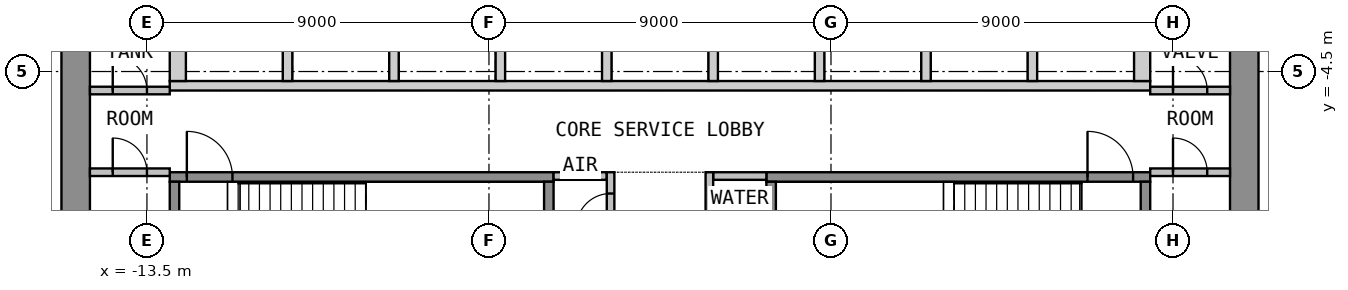
"""IFC4 building model, lengths in metres.
Left out: names, types, materials, properties, quantities, classifications, styles, units other than length and angle.
Written with IfcOpenShell. Run it as: python <this file> out.ifc"""

import sys

from ifc_helpers import new_model, si_unit, direction, frame, frame_2d, origin, place, context, subcontext, project, spatial, polyline, rectangle, outline, extrude, element, fill, save


model = new_model("IFC4")
c1 = context("Model", 3, precision=1e-05, world=origin(), true_north=direction((0.0, 1.0)))
c2 = subcontext(c1, "Body", "Model", "MODEL_VIEW")
j1 = project(units=[si_unit("LENGTHUNIT", "METRE"), si_unit("PLANEANGLEUNIT", "RADIAN")], contexts=[c1])
p1 = place(None, origin())
s1 = spatial("IfcSite", under=j1, at=p1, CompositionType="ELEMENT")
p2 = place(p1, origin())
s2 = spatial("IfcBuilding", under=s1, at=p2, CompositionType="ELEMENT")
p3 = place(p2, frame((0.0, 0.0, 128.1)))
s3 = spatial("IfcBuildingStorey", under=s2, at=p3, CompositionType="ELEMENT", Elevation=128.1)
p4 = place(p3, frame((-15.375, -12.75, 0.0), z_axis=(0.0, 0.0, 1.0), x_axis=(0.0, 1.0, 0.0)))
e1 = element("IfcWall", 1, at=p4, inside=s3, PredefinedType="SHEAR", context=c2, shape_type="SweptSolid", body=[
    extrude(rectangle(XDim=25.5, YDim=0.75, at=frame_2d((12.75, 0.0))), origin(), (0.0, 0.0, 1.0), 4.175),
])
p5 = place(p4, frame((11.55, 0.0, 0.0)))
e2 = element("IfcOpeningElement", 2, at=p5, cuts=e1, PredefinedType="OPENING", context=c2, shape_type="SweptSolid", body=[
    extrude(rectangle(XDim=2.4, YDim=2.1, at=frame_2d((1.2, 1.05))), frame((0.0, 0.385, 0.0), z_axis=(0.0, -1.0, 0.0), x_axis=(1.0, 0.0, 0.0)), (0.0, 0.0, 1.0), 0.77),
])
p6 = place(p3, frame((15.375, -12.75, 0.0), z_axis=(0.0, 0.0, 1.0), x_axis=(0.0, 1.0, 0.0)))
e3 = element("IfcWall", 3, at=p6, inside=s3, PredefinedType="SHEAR", context=c2, shape_type="SweptSolid", body=[
    extrude(rectangle(XDim=25.5, YDim=0.75, at=frame_2d((12.75, 0.0))), origin(), (0.0, 0.0, 1.0), 4.175),
])
p7 = place(p6, frame((11.55, 0.0, 0.0)))
e4 = element("IfcOpeningElement", 4, at=p7, cuts=e3, PredefinedType="OPENING", context=c2, shape_type="SweptSolid", body=[
    extrude(rectangle(XDim=2.4, YDim=2.1, at=frame_2d((1.2, 1.05))), frame((0.0, 0.385, 0.0), z_axis=(0.0, -1.0, 0.0), x_axis=(1.0, 0.0, 0.0)), (0.0, 0.0, 1.0), 0.77),
])
p8 = place(p3, origin())
e5 = element("IfcWall", 5, at=p8, inside=s3, PredefinedType="SHEAR", context=c2, shape_type="SweptSolid", body=[
    extrude(outline(polyline([(-12.9, -5.0), (12.9, -5.0), (12.9, -4.75), (-12.9, -4.75), (-12.9, -5.0)])), origin(), (0.0, 0.0, 1.0), 4.175),
])
p9 = place(p3, origin())
e6 = element("IfcWall", 6, at=p9, inside=s3, PredefinedType="SHEAR", context=c2, shape_type="SweptSolid", body=[
    extrude(outline(polyline([(-12.9, -4.75), (-12.475, -4.75), (-12.475, -2.05), (-12.9, -2.05), (-12.9, -4.75)])), origin(), (0.0, 0.0, 1.0), 4.175),
])
p10 = place(p3, origin())
e7 = element("IfcWall", 7, at=p10, inside=s3, PredefinedType="SHEAR", context=c2, shape_type="SweptSolid", body=[
    extrude(outline(polyline([(-9.925, -4.75), (-9.675, -4.75), (-9.675, -2.05), (-9.925, -2.05), (-9.925, -4.75)])), origin(), (0.0, 0.0, 1.0), 4.175),
])
p11 = place(p3, origin())
e8 = element("IfcWall", 8, at=p11, inside=s3, PredefinedType="SHEAR", context=c2, shape_type="SweptSolid", body=[
    extrude(outline(polyline([(-7.125, -4.75), (-6.875, -4.75), (-6.875, -2.05), (-7.125, -2.05), (-7.125, -4.75)])), origin(), (0.0, 0.0, 1.0), 4.175),
])
p12 = place(p3, origin())
e9 = element("IfcWall", 9, at=p12, inside=s3, PredefinedType="SHEAR", context=c2, shape_type="SweptSolid", body=[
    extrude(outline(polyline([(-4.325, -4.75), (-4.075, -4.75), (-4.075, -2.05), (-4.325, -2.05), (-4.325, -4.75)])), origin(), (0.0, 0.0, 1.0), 4.175),
])
p13 = place(p3, origin())
e10 = element("IfcWall", 10, at=p13, inside=s3, PredefinedType="SHEAR", context=c2, shape_type="SweptSolid", body=[
    extrude(outline(polyline([(-1.525, -4.75), (-1.275, -4.75), (-1.275, -2.05), (-1.525, -2.05), (-1.525, -4.75)])), origin(), (0.0, 0.0, 1.0), 4.175),
])
p14 = place(p3, origin())
e11 = element("IfcWall", 11, at=p14, inside=s3, PredefinedType="SHEAR", context=c2, shape_type="SweptSolid", body=[
    extrude(outline(polyline([(1.275, -4.75), (1.525, -4.75), (1.525, -2.05), (1.275, -2.05), (1.275, -4.75)])), origin(), (0.0, 0.0, 1.0), 4.175),
])
p15 = place(p3, origin())
e12 = element("IfcWall", 12, at=p15, inside=s3, PredefinedType="SHEAR", context=c2, shape_type="SweptSolid", body=[
    extrude(outline(polyline([(4.075, -4.75), (4.325, -4.75), (4.325, -2.05), (4.075, -2.05), (4.075, -4.75)])), origin(), (0.0, 0.0, 1.0), 4.175),
])
p16 = place(p3, origin())
e13 = element("IfcWall", 13, at=p16, inside=s3, PredefinedType="SHEAR", context=c2, shape_type="SweptSolid", body=[
    extrude(outline(polyline([(6.875, -4.75), (7.125, -4.75), (7.125, -2.05), (6.875, -2.05), (6.875, -4.75)])), origin(), (0.0, 0.0, 1.0), 4.175),
])
p17 = place(p3, origin())
e14 = element("IfcWall", 14, at=p17, inside=s3, PredefinedType="SHEAR", context=c2, shape_type="SweptSolid", body=[
    extrude(outline(polyline([(9.675, -4.75), (9.925, -4.75), (9.925, -2.05), (9.675, -2.05), (9.675, -4.75)])), origin(), (0.0, 0.0, 1.0), 4.175),
])
p18 = place(p3, origin())
e15 = element("IfcWall", 15, at=p18, inside=s3, PredefinedType="SHEAR", context=c2, shape_type="SweptSolid", body=[
    extrude(outline(polyline([(12.475, -4.75), (12.9, -4.75), (12.9, -2.05), (12.475, -2.05), (12.475, -4.75)])), origin(), (0.0, 0.0, 1.0), 4.175),
])
p19 = place(p3, frame((-12.9, -7.275, 0.0), z_axis=(0.0, 0.0, 1.0), x_axis=(1.0, 0.0, 0.0)))
e16 = element("IfcWall", 16, at=p19, inside=s3, PredefinedType="SHEAR", context=c2, shape_type="SweptSolid", body=[
    extrude(rectangle(XDim=10.1, YDim=0.25, at=frame_2d((5.05, 0.0))), origin(), (0.0, 0.0, 1.0), 4.175),
])
p20 = place(p19, frame((0.45, 0.0, 0.0)))
e17 = element("IfcOpeningElement", 17, at=p20, cuts=e16, PredefinedType="OPENING", context=c2, shape_type="SweptSolid", body=[
    extrude(rectangle(XDim=1.2, YDim=2.1, at=frame_2d((0.6, 1.05))), frame((0.0, 0.135, 0.0), z_axis=(0.0, -1.0, 0.0), x_axis=(1.0, 0.0, 0.0)), (0.0, 0.0, 1.0), 0.27),
])
for number, where, z_axis, x_axis in (
    (18, (-12.775, -10.65, 0.0), (0.0, 0.0, 1.0), (0.0, 1.0, 0.0)),
    (19, (-2.925, -10.65, 0.0), (0.0, 0.0, 1.0), (0.0, 1.0, 0.0)),
):
    element("IfcWall", number, at=place(p3, frame(where, z_axis=z_axis, x_axis=x_axis)), inside=s3, PredefinedType="SHEAR", context=c2, shape_type="SweptSolid", body=[
        extrude(rectangle(XDim=3.25, YDim=0.25, at=frame_2d((1.625, 0.0))), origin(), (0.0, 0.0, 1.0), 4.175),
    ])
p21 = place(p3, frame((2.8, -7.275, 0.0), z_axis=(0.0, 0.0, 1.0), x_axis=(1.0, 0.0, 0.0)))
e20 = element("IfcWall", 20, at=p21, inside=s3, PredefinedType="SHEAR", context=c2, shape_type="SweptSolid", body=[
    extrude(rectangle(XDim=10.1, YDim=0.25, at=frame_2d((5.05, 0.0))), origin(), (0.0, 0.0, 1.0), 4.175),
])
p22 = place(p21, frame((8.45, 0.0, 0.0)))
e21 = element("IfcOpeningElement", 21, at=p22, cuts=e20, PredefinedType="OPENING", context=c2, shape_type="SweptSolid", body=[
    extrude(rectangle(XDim=1.2, YDim=2.1, at=frame_2d((0.6, 1.05))), frame((0.0, 0.135, 0.0), z_axis=(0.0, -1.0, 0.0), x_axis=(1.0, 0.0, 0.0)), (0.0, 0.0, 1.0), 0.27),
])
for number, where, z_axis, x_axis in (
    (22, (2.925, -10.65, 0.0), (0.0, 0.0, 1.0), (0.0, 1.0, 0.0)),
    (23, (12.775, -10.65, 0.0), (0.0, 0.0, 1.0), (0.0, 1.0, 0.0)),
):
    element("IfcWall", number, at=place(p3, frame(where, z_axis=z_axis, x_axis=x_axis)), inside=s3, PredefinedType="SHEAR", context=c2, shape_type="SweptSolid", body=[
        extrude(rectangle(XDim=3.25, YDim=0.25, at=frame_2d((1.625, 0.0))), origin(), (0.0, 0.0, 1.0), 4.175),
    ])
for number, where, z_axis, x_axis in (
    (24, (-2.8, -7.25, 0.0), (0.0, 0.0, 1.0), (1.0, 0.0, 0.0)),
    (25, (1.4, -7.25, 0.0), (0.0, 0.0, 1.0), (1.0, 0.0, 0.0)),
):
    element("IfcWall", number, at=place(p3, frame(where, z_axis=z_axis, x_axis=x_axis)), inside=s3, PredefinedType="PARTITIONING", context=c2, shape_type="SweptSolid", body=[
        extrude(rectangle(XDim=1.4, YDim=0.2, at=frame_2d((0.7, 0.0))), origin(), (0.0, 0.0, 1.0), 4.175),
    ])
p23 = place(p3, frame((-1.3, -12.75, 0.0), z_axis=(0.0, 0.0, 1.0), x_axis=(0.0, 1.0, 0.0)))
e26 = element("IfcWall", 26, at=p23, inside=s3, PredefinedType="PARTITIONING", context=c2, shape_type="SweptSolid", body=[
    extrude(rectangle(XDim=5.6, YDim=0.2, at=frame_2d((2.8, 0.0))), origin(), (0.0, 0.0, 1.0), 4.175),
])
p24 = place(p23, frame((1.44, 0.0, 0.0)))
e27 = element("IfcOpeningElement", 27, at=p24, cuts=e26, PredefinedType="OPENING", context=c2, shape_type="SweptSolid", body=[
    extrude(rectangle(XDim=0.9, YDim=2.1, at=frame_2d((0.45, 1.05))), frame((0.0, 0.11, 0.0), z_axis=(0.0, -1.0, 0.0), x_axis=(1.0, 0.0, 0.0)), (0.0, 0.0, 1.0), 0.22),
])
p25 = place(p23, frame((4.14, 0.0, 0.0)))
e28 = element("IfcOpeningElement", 28, at=p25, cuts=e26, PredefinedType="OPENING", context=c2, shape_type="SweptSolid", body=[
    extrude(rectangle(XDim=0.9, YDim=2.1, at=frame_2d((0.45, 1.05))), frame((0.0, 0.11, 0.0), z_axis=(0.0, -1.0, 0.0), x_axis=(1.0, 0.0, 0.0)), (0.0, 0.0, 1.0), 0.22),
])
p26 = place(p3, frame((1.3, -12.75, 0.0), z_axis=(0.0, 0.0, 1.0), x_axis=(0.0, 1.0, 0.0)))
e29 = element("IfcWall", 29, at=p26, inside=s3, PredefinedType="PARTITIONING", context=c2, shape_type="SweptSolid", body=[
    extrude(rectangle(XDim=5.6, YDim=0.2, at=frame_2d((2.8, 0.0))), origin(), (0.0, 0.0, 1.0), 4.175),
])
p27 = place(p26, frame((0.36, 0.0, 0.0)))
e30 = element("IfcOpeningElement", 30, at=p27, cuts=e29, PredefinedType="OPENING", context=c2, shape_type="SweptSolid", body=[
    extrude(rectangle(XDim=0.9, YDim=2.1, at=frame_2d((0.45, 1.05))), frame((0.0, 0.11, 0.0), z_axis=(0.0, -1.0, 0.0), x_axis=(1.0, 0.0, 0.0)), (0.0, 0.0, 1.0), 0.22),
])
p28 = place(p26, frame((3.06, 0.0, 0.0)))
e31 = element("IfcOpeningElement", 31, at=p28, cuts=e29, PredefinedType="OPENING", context=c2, shape_type="SweptSolid", body=[
    extrude(rectangle(XDim=0.9, YDim=2.1, at=frame_2d((0.45, 1.05))), frame((0.0, 0.11, 0.0), z_axis=(0.0, -1.0, 0.0), x_axis=(1.0, 0.0, 0.0)), (0.0, 0.0, 1.0), 0.22),
])
p29 = place(p3, frame((-15.0, -7.15, 0.0), z_axis=(0.0, 0.0, 1.0), x_axis=(1.0, 0.0, 0.0)))
e32 = element("IfcWall", 32, at=p29, inside=s3, PredefinedType="PARTITIONING", context=c2, shape_type="SweptSolid", body=[
    extrude(rectangle(XDim=2.1, YDim=0.2, at=frame_2d((1.05, 0.0))), origin(), (0.0, 0.0, 1.0), 4.175),
])
p30 = place(p29, frame((0.6, 0.0, 0.0)))
e33 = element("IfcOpeningElement", 33, at=p30, cuts=e32, PredefinedType="OPENING", context=c2, shape_type="SweptSolid", body=[
    extrude(rectangle(XDim=0.9, YDim=2.1, at=frame_2d((0.45, 1.05))), frame((0.0, 0.11, 0.0), z_axis=(0.0, -1.0, 0.0), x_axis=(1.0, 0.0, 0.0)), (0.0, 0.0, 1.0), 0.22),
])
p31 = place(p3, frame((-15.0, -5.0, 0.0), z_axis=(0.0, 0.0, 1.0), x_axis=(1.0, 0.0, 0.0)))
e34 = element("IfcWall", 34, at=p31, inside=s3, PredefinedType="PARTITIONING", context=c2, shape_type="SweptSolid", body=[
    extrude(rectangle(XDim=2.1, YDim=0.2, at=frame_2d((1.05, 0.0))), origin(), (0.0, 0.0, 1.0), 4.175),
])
p32 = place(p31, frame((0.6, 0.0, 0.0)))
e35 = element("IfcOpeningElement", 35, at=p32, cuts=e34, PredefinedType="OPENING", context=c2, shape_type="SweptSolid", body=[
    extrude(rectangle(XDim=0.9, YDim=2.1, at=frame_2d((0.45, 1.05))), frame((0.0, 0.11, 0.0), z_axis=(0.0, -1.0, 0.0), x_axis=(1.0, 0.0, 0.0)), (0.0, 0.0, 1.0), 0.22),
])
p33 = place(p3, frame((12.9, -7.15, 0.0), z_axis=(0.0, 0.0, 1.0), x_axis=(1.0, 0.0, 0.0)))
e36 = element("IfcWall", 36, at=p33, inside=s3, PredefinedType="PARTITIONING", context=c2, shape_type="SweptSolid", body=[
    extrude(rectangle(XDim=2.1, YDim=0.2, at=frame_2d((1.05, 0.0))), origin(), (0.0, 0.0, 1.0), 4.175),
])
p34 = place(p33, frame((0.6, 0.0, 0.0)))
e37 = element("IfcOpeningElement", 37, at=p34, cuts=e36, PredefinedType="OPENING", context=c2, shape_type="SweptSolid", body=[
    extrude(rectangle(XDim=0.9, YDim=2.1, at=frame_2d((0.45, 1.05))), frame((0.0, 0.11, 0.0), z_axis=(0.0, -1.0, 0.0), x_axis=(1.0, 0.0, 0.0)), (0.0, 0.0, 1.0), 0.22),
])
p35 = place(p3, frame((12.9, -5.0, 0.0), z_axis=(0.0, 0.0, 1.0), x_axis=(1.0, 0.0, 0.0)))
e38 = element("IfcWall", 38, at=p35, inside=s3, PredefinedType="PARTITIONING", context=c2, shape_type="SweptSolid", body=[
    extrude(rectangle(XDim=2.1, YDim=0.2, at=frame_2d((1.05, 0.0))), origin(), (0.0, 0.0, 1.0), 4.175),
])
p36 = place(p35, frame((0.6, 0.0, 0.0)))
e39 = element("IfcOpeningElement", 39, at=p36, cuts=e38, PredefinedType="OPENING", context=c2, shape_type="SweptSolid", body=[
    extrude(rectangle(XDim=0.9, YDim=2.1, at=frame_2d((0.45, 1.05))), frame((0.0, 0.11, 0.0), z_axis=(0.0, -1.0, 0.0), x_axis=(1.0, 0.0, 0.0)), (0.0, 0.0, 1.0), 0.22),
])
p37 = place(p20, origin())
e40 = element("IfcDoor", 40, at=p37, inside=s3, OperationType="SINGLE_SWING_LEFT", PredefinedType="DOOR", context=c2, shape_type="SweptSolid", body=[
    extrude(rectangle(XDim=1.2, YDim=2.1, at=frame_2d((0.6, 1.05))), frame((0.0, 0.025, 0.0), z_axis=(0.0, -1.0, 0.0), x_axis=(1.0, 0.0, 0.0)), (0.0, 0.0, 1.0), 0.05),
])
fill(e17, e40)
p38 = place(p22, origin())
e41 = element("IfcDoor", 41, at=p38, inside=s3, OperationType="SINGLE_SWING_LEFT", PredefinedType="DOOR", context=c2, shape_type="SweptSolid", body=[
    extrude(rectangle(XDim=1.2, YDim=2.1, at=frame_2d((0.6, 1.05))), frame((0.0, 0.025, 0.0), z_axis=(0.0, -1.0, 0.0), x_axis=(1.0, 0.0, 0.0)), (0.0, 0.0, 1.0), 0.05),
])
fill(e21, e41)
p39 = place(p25, origin())
e42 = element("IfcDoor", 42, at=p39, inside=s3, OperationType="SINGLE_SWING_LEFT", PredefinedType="DOOR", context=c2, shape_type="SweptSolid", body=[
    extrude(rectangle(XDim=0.9, YDim=2.1, at=frame_2d((0.45, 1.05))), frame((0.0, 0.025, 0.0), z_axis=(0.0, -1.0, 0.0), x_axis=(1.0, 0.0, 0.0)), (0.0, 0.0, 1.0), 0.05),
])
fill(e28, e42)
p40 = place(p30, origin())
e43 = element("IfcDoor", 43, at=p40, inside=s3, OperationType="SINGLE_SWING_LEFT", PredefinedType="DOOR", context=c2, shape_type="SweptSolid", body=[
    extrude(rectangle(XDim=0.9, YDim=2.1, at=frame_2d((0.45, 1.05))), frame((0.0, 0.025, 0.0), z_axis=(0.0, -1.0, 0.0), x_axis=(1.0, 0.0, 0.0)), (0.0, 0.0, 1.0), 0.05),
])
fill(e33, e43)
p41 = place(p32, origin())
e44 = element("IfcDoor", 44, at=p41, inside=s3, OperationType="SINGLE_SWING_LEFT", PredefinedType="DOOR", context=c2, shape_type="SweptSolid", body=[
    extrude(rectangle(XDim=0.9, YDim=2.1, at=frame_2d((0.45, 1.05))), frame((0.0, 0.025, 0.0), z_axis=(0.0, -1.0, 0.0), x_axis=(1.0, 0.0, 0.0)), (0.0, 0.0, 1.0), 0.05),
])
fill(e35, e44)
p42 = place(p34, origin())
e45 = element("IfcDoor", 45, at=p42, inside=s3, OperationType="SINGLE_SWING_LEFT", PredefinedType="DOOR", context=c2, shape_type="SweptSolid", body=[
    extrude(rectangle(XDim=0.9, YDim=2.1, at=frame_2d((0.45, 1.05))), frame((0.0, 0.025, 0.0), z_axis=(0.0, -1.0, 0.0), x_axis=(1.0, 0.0, 0.0)), (0.0, 0.0, 1.0), 0.05),
])
fill(e37, e45)
p43 = place(p36, origin())
e46 = element("IfcDoor", 46, at=p43, inside=s3, OperationType="SINGLE_SWING_LEFT", PredefinedType="DOOR", context=c2, shape_type="SweptSolid", body=[
    extrude(rectangle(XDim=0.9, YDim=2.1, at=frame_2d((0.45, 1.05))), frame((0.0, 0.025, 0.0), z_axis=(0.0, -1.0, 0.0), x_axis=(1.0, 0.0, 0.0)), (0.0, 0.0, 1.0), 0.05),
])
fill(e39, e46)
save(model, sys.argv[1])
